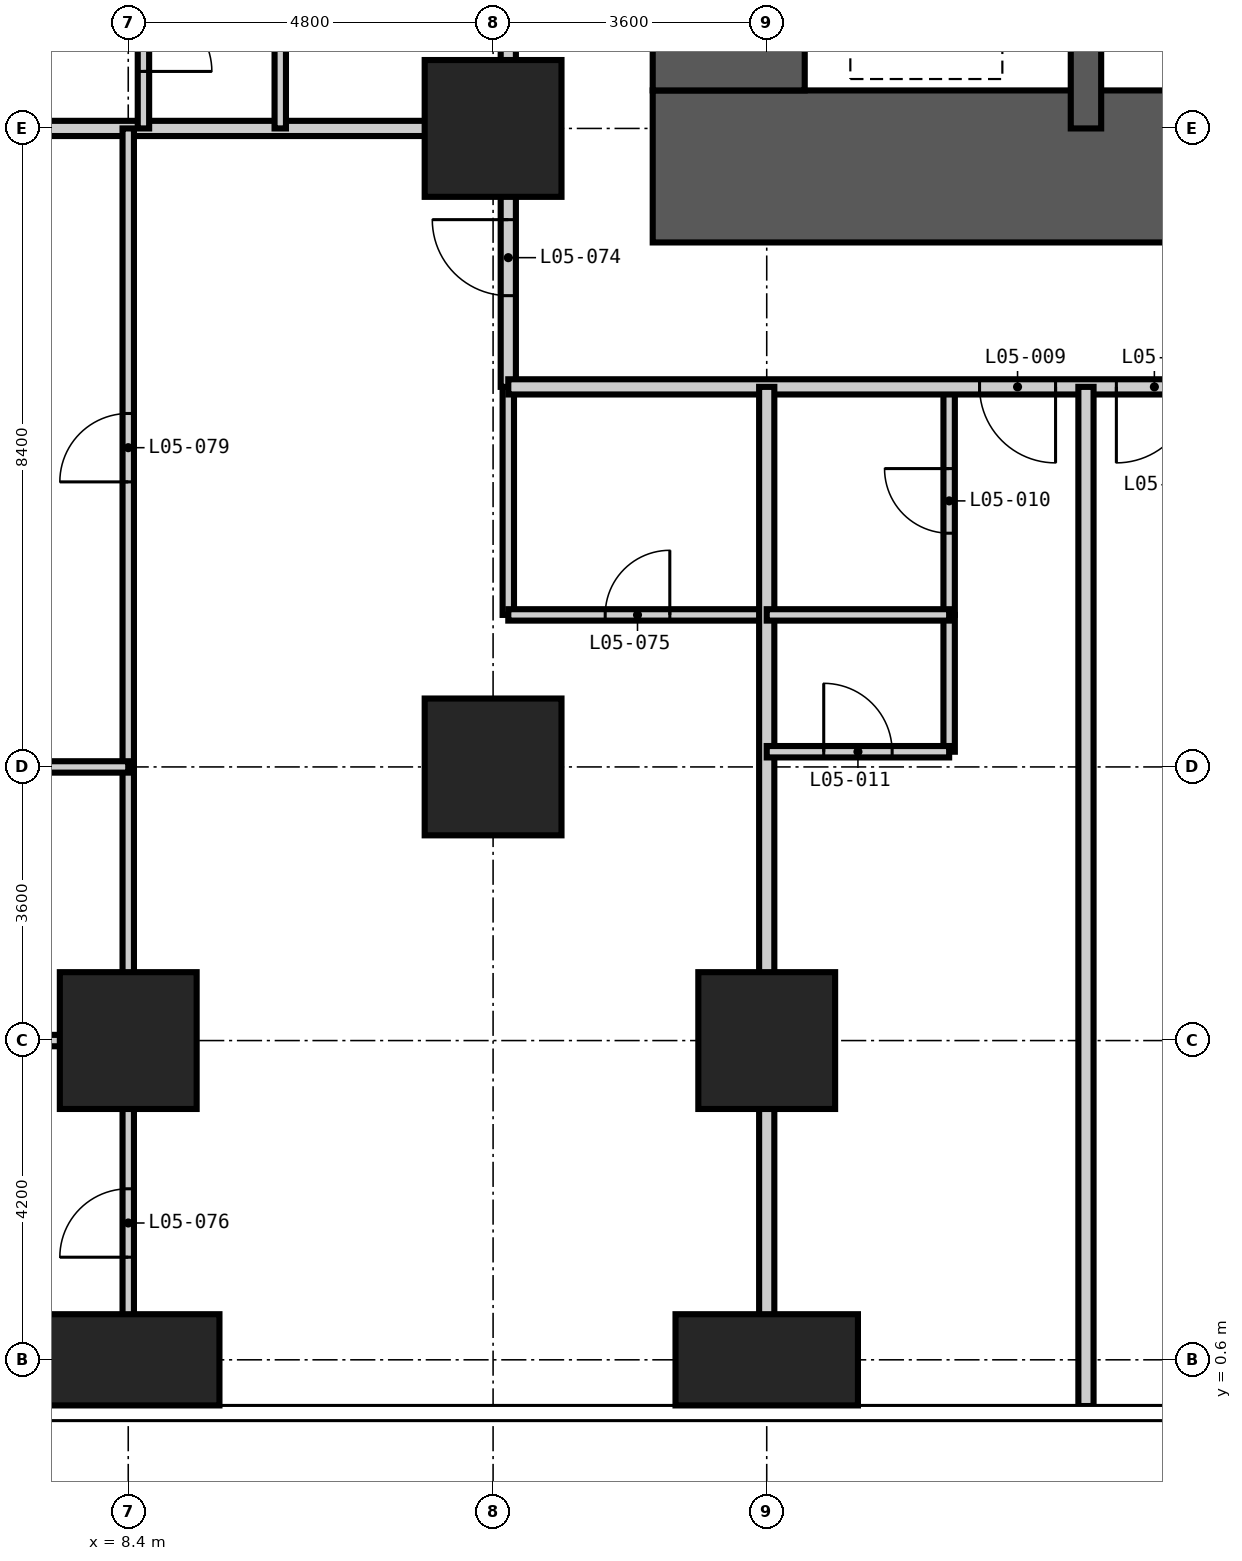
"""IFC4 building model, lengths in metres.
Left out: names, types, materials, properties, quantities, classifications, styles, units other than length and angle.
Written with IfcOpenShell. Run it as: python <this file> out.ifc"""

import sys

from ifc_helpers import new_model, si_unit, direction, frame, frame_2d, origin, origin_2d, place, context, subcontext, project, spatial, rectangle, extrude, element, fill, save


model = new_model("IFC4")
c1 = context("Model", 3, precision=1e-05, world=origin(), true_north=direction((0.0, 1.0)))
c2 = subcontext(c1, "Body", "Model", "MODEL_VIEW")
j1 = project(units=[si_unit("LENGTHUNIT", "METRE"), si_unit("PLANEANGLEUNIT", "RADIAN")], contexts=[c1])
p1 = place(None, origin())
s1 = spatial("IfcSite", under=j1, at=p1, CompositionType="ELEMENT")
p2 = place(p1, origin())
s2 = spatial("IfcBuilding", under=s1, at=p2, CompositionType="ELEMENT")
p3 = place(p2, frame((0.0, 0.0, 27.0)))
s3 = spatial("IfcBuildingStorey", under=s2, at=p3, CompositionType="ELEMENT", Elevation=27.0)
p4 = place(p3, frame((8.4, 0.6, -0.35), z_axis=(0.0, 0.0, 1.0), x_axis=(1.0, 0.0, 0.0)))
e1 = element("IfcColumn", 1, at=p4, inside=s3, PredefinedType="COLUMN", context=c2, shape_type="SweptSolid", body=[
    extrude(rectangle(XDim=2.4, YDim=1.2, at=origin_2d()), origin(), (0.0, 0.0, 1.0), 3.6),
])
for number, where, z_axis, x_axis in (
    (2, (8.4, 4.8, -0.35), (0.0, 0.0, 1.0), (1.0, 0.0, 0.0)),
    (3, (13.2, 8.4, -0.35), (0.0, 0.0, 1.0), (1.0, 0.0, 0.0)),
    (4, (13.2, 16.8, -0.35), (0.0, 0.0, 1.0), (1.0, 0.0, 0.0)),
):
    element("IfcColumn", number, at=place(p3, frame(where, z_axis=z_axis, x_axis=x_axis)), inside=s3, PredefinedType="COLUMN", context=c2, shape_type="SweptSolid", body=[
        extrude(rectangle(XDim=1.8, YDim=1.8, at=origin_2d()), origin(), (0.0, 0.0, 1.0), 3.6),
    ])
p5 = place(p3, frame((16.8, 0.6, -0.35), z_axis=(0.0, 0.0, 1.0), x_axis=(1.0, 0.0, 0.0)))
e5 = element("IfcColumn", 5, at=p5, inside=s3, PredefinedType="COLUMN", context=c2, shape_type="SweptSolid", body=[
    extrude(rectangle(XDim=2.4, YDim=1.2, at=origin_2d()), origin(), (0.0, 0.0, 1.0), 3.6),
])
p6 = place(p3, frame((16.8, 4.8, -0.35), z_axis=(0.0, 0.0, 1.0), x_axis=(1.0, 0.0, 0.0)))
e6 = element("IfcColumn", 6, at=p6, inside=s3, PredefinedType="COLUMN", context=c2, shape_type="SweptSolid", body=[
    extrude(rectangle(XDim=1.8, YDim=1.8, at=origin_2d()), origin(), (0.0, 0.0, 1.0), 3.6),
])
p7 = place(p3, frame((15.3, 16.3, -0.35), z_axis=(0.0, 0.0, 1.0), x_axis=(1.0, 0.0, 0.0)))
e7 = element("IfcWall", 7, at=p7, inside=s3, PredefinedType="SHEAR", context=c2, shape_type="SweptSolid", body=[
    extrude(rectangle(XDim=28.2, YDim=2.0, at=frame_2d((14.1, 0.0))), origin(), (0.0, 0.0, 1.0), 3.6),
])
p8 = place(p7, frame((13.6, 0.0, 0.35)))
e8 = element("IfcOpeningElement", 8, at=p8, cuts=e7, PredefinedType="OPENING", context=c2, shape_type="SweptSolid", body=[
    extrude(rectangle(XDim=1.0, YDim=2.1, at=frame_2d((0.5, 1.05))), frame((0.0, 1.01, 0.0), z_axis=(0.0, -1.0, 0.0), x_axis=(1.0, 0.0, 0.0)), (0.0, 0.0, 1.0), 2.02),
])
p9 = place(p7, frame((19.9, 0.0, 0.35)))
e9 = element("IfcOpeningElement", 9, at=p9, cuts=e7, PredefinedType="OPENING", context=c2, shape_type="SweptSolid", body=[
    extrude(rectangle(XDim=1.0, YDim=2.1, at=frame_2d((0.5, 1.05))), frame((0.0, 1.01, 0.0), z_axis=(0.0, -1.0, 0.0), x_axis=(1.0, 0.0, 0.0)), (0.0, 0.0, 1.0), 2.02),
])
p10 = place(p3, frame((16.3, 41.5, -0.35), z_axis=(0.0, 0.0, 1.0), x_axis=(0.0, -1.0, 0.0)))
e10 = element("IfcWall", 10, at=p10, inside=s3, PredefinedType="SHEAR", context=c2, shape_type="SweptSolid", body=[
    extrude(rectangle(XDim=24.2, YDim=2.0, at=frame_2d((12.1, 0.0))), origin(), (0.0, 0.0, 1.0), 3.6),
])
p11 = place(p10, frame((11.2, 0.0, 0.35)))
e11 = element("IfcOpeningElement", 11, at=p11, cuts=e10, PredefinedType="OPENING", context=c2, shape_type="SweptSolid", body=[
    extrude(rectangle(XDim=1.8, YDim=2.2, at=frame_2d((0.9, 1.1))), frame((0.0, 1.01, 0.0), z_axis=(0.0, -1.0, 0.0), x_axis=(1.0, 0.0, 0.0)), (0.0, 0.0, 1.0), 2.02),
])
p12 = place(p10, frame((20.0, 0.0, 0.35)))
e12 = element("IfcOpeningElement", 12, at=p12, cuts=e10, PredefinedType="OPENING", context=c2, shape_type="SweptSolid", body=[
    extrude(rectangle(XDim=1.0, YDim=2.1, at=frame_2d((0.5, 1.05))), frame((0.0, 1.01, 0.0), z_axis=(0.0, -1.0, 0.0), x_axis=(1.0, 0.0, 0.0)), (0.0, 0.0, 1.0), 2.02),
])
p13 = place(p10, frame((5.3, 0.0, 0.35)))
e13 = element("IfcOpeningElement", 13, at=p13, cuts=e10, PredefinedType="OPENING", context=c2, shape_type="SweptSolid", body=[
    extrude(rectangle(XDim=1.0, YDim=2.1, at=frame_2d((0.5, 1.05))), frame((0.0, 1.01, 0.0), z_axis=(0.0, -1.0, 0.0), x_axis=(1.0, 0.0, 0.0)), (0.0, 0.0, 1.0), 2.02),
])
p14 = place(p3, frame((21.0, 16.8, -0.35), z_axis=(0.0, 0.0, 1.0), x_axis=(0.0, 1.0, 0.0)))
e14 = element("IfcWall", 14, at=p14, inside=s3, PredefinedType="SHEAR", context=c2, shape_type="SweptSolid", body=[
    extrude(rectangle(XDim=2.8, YDim=0.4, at=frame_2d((1.4, 0.0))), origin(), (0.0, 0.0, 1.0), 3.6),
])
p15 = place(p3, frame((13.4, 10.4, 0.0), z_axis=(0.0, 0.0, 1.0), x_axis=(0.0, 1.0, 0.0)))
e15 = element("IfcWall", 15, at=p15, inside=s3, PredefinedType="PARTITIONING", context=c2, shape_type="SweptSolid", body=[
    extrude(rectangle(XDim=3.0, YDim=0.15, at=frame_2d((1.5, 0.0))), origin(), (0.0, 0.0, 1.0), 3.25),
])
p16 = place(p3, frame((19.2, 10.4, 0.0), z_axis=(0.0, 0.0, 1.0), x_axis=(0.0, 1.0, 0.0)))
e16 = element("IfcWall", 16, at=p16, inside=s3, PredefinedType="PARTITIONING", context=c2, shape_type="SweptSolid", body=[
    extrude(rectangle(XDim=3.0, YDim=0.15, at=frame_2d((1.5, 0.0))), origin(), (0.0, 0.0, 1.0), 3.25),
])
p17 = place(p16, frame((1.075, 0.0, 0.0)))
e17 = element("IfcOpeningElement", 17, at=p17, cuts=e16, PredefinedType="OPENING", context=c2, shape_type="SweptSolid", body=[
    extrude(rectangle(XDim=0.85, YDim=2.1, at=frame_2d((0.425, 1.05))), frame((0.0, 0.085, 0.0), z_axis=(0.0, -1.0, 0.0), x_axis=(1.0, 0.0, 0.0)), (0.0, 0.0, 1.0), 0.17),
])
p18 = place(p3, frame((5.4, 4.8, 0.0), z_axis=(0.0, 0.0, 1.0), x_axis=(1.0, 0.0, 0.0)))
e18 = element("IfcWall", 18, at=p18, inside=s3, PredefinedType="PARTITIONING", context=c2, shape_type="SweptSolid", body=[
    extrude(rectangle(XDim=3.0, YDim=0.15, at=frame_2d((1.5, 0.0))), origin(), (0.0, 0.0, 1.0), 3.25),
])
p19 = place(p3, frame((13.4, 10.4, 0.0), z_axis=(0.0, 0.0, 1.0), x_axis=(1.0, 0.0, 0.0)))
e19 = element("IfcWall", 19, at=p19, inside=s3, PredefinedType="PARTITIONING", context=c2, shape_type="SweptSolid", body=[
    extrude(rectangle(XDim=3.4, YDim=0.15, at=frame_2d((1.7, 0.0))), origin(), (0.0, 0.0, 1.0), 3.25),
])
p20 = place(p19, frame((1.275, 0.0, 0.0)))
e20 = element("IfcOpeningElement", 20, at=p20, cuts=e19, PredefinedType="OPENING", context=c2, shape_type="SweptSolid", body=[
    extrude(rectangle(XDim=0.85, YDim=2.1, at=frame_2d((0.425, 1.05))), frame((0.0, 0.085, 0.0), z_axis=(0.0, -1.0, 0.0), x_axis=(1.0, 0.0, 0.0)), (0.0, 0.0, 1.0), 0.17),
])
p21 = place(p3, frame((13.4, 13.4, 0.0), z_axis=(0.0, 0.0, 1.0), x_axis=(0.0, 1.0, 0.0)))
e21 = element("IfcWall", 21, at=p21, inside=s3, PredefinedType="PARTITIONING", context=c2, shape_type="SweptSolid", body=[
    extrude(rectangle(XDim=20.2, YDim=0.2, at=frame_2d((10.1, 0.0))), origin(), (0.0, 0.0, 1.0), 3.25),
])
p22 = place(p21, frame((6.2, 0.0, 0.0)))
e22 = element("IfcOpeningElement", 22, at=p22, cuts=e21, PredefinedType="OPENING", context=c2, shape_type="SweptSolid", body=[
    extrude(rectangle(XDim=1.0, YDim=2.2, at=frame_2d((0.5, 1.1))), frame((0.0, 0.11, 0.0), z_axis=(0.0, -1.0, 0.0), x_axis=(1.0, 0.0, 0.0)), (0.0, 0.0, 1.0), 0.22),
])
p23 = place(p21, frame((8.0, 0.0, 0.0)))
e23 = element("IfcOpeningElement", 23, at=p23, cuts=e21, PredefinedType="OPENING", context=c2, shape_type="SweptSolid", body=[
    extrude(rectangle(XDim=1.0, YDim=2.2, at=frame_2d((0.5, 1.1))), frame((0.0, 0.11, 0.0), z_axis=(0.0, -1.0, 0.0), x_axis=(1.0, 0.0, 0.0)), (0.0, 0.0, 1.0), 0.22),
])
p24 = place(p21, frame((14.6, 0.0, 0.0)))
e24 = element("IfcOpeningElement", 24, at=p24, cuts=e21, PredefinedType="OPENING", context=c2, shape_type="SweptSolid", body=[
    extrude(rectangle(XDim=1.0, YDim=2.2, at=frame_2d((0.5, 1.1))), frame((0.0, 0.11, 0.0), z_axis=(0.0, -1.0, 0.0), x_axis=(1.0, 0.0, 0.0)), (0.0, 0.0, 1.0), 0.22),
])
p25 = place(p21, frame((16.4, 0.0, 0.0)))
e25 = element("IfcOpeningElement", 25, at=p25, cuts=e21, PredefinedType="OPENING", context=c2, shape_type="SweptSolid", body=[
    extrude(rectangle(XDim=1.0, YDim=2.2, at=frame_2d((0.5, 1.1))), frame((0.0, 0.11, 0.0), z_axis=(0.0, -1.0, 0.0), x_axis=(1.0, 0.0, 0.0)), (0.0, 0.0, 1.0), 0.22),
])
p26 = place(p21, frame((1.2, 0.0, 0.0)))
e26 = element("IfcOpeningElement", 26, at=p26, cuts=e21, PredefinedType="OPENING", context=c2, shape_type="SweptSolid", body=[
    extrude(rectangle(XDim=1.0, YDim=2.2, at=frame_2d((0.5, 1.1))), frame((0.0, 0.11, 0.0), z_axis=(0.0, -1.0, 0.0), x_axis=(1.0, 0.0, 0.0)), (0.0, 0.0, 1.0), 0.22),
])
p27 = place(p3, frame((45.7, 13.4, 0.0), z_axis=(0.0, 0.0, 1.0), x_axis=(-1.0, 0.0, 0.0)))
e27 = element("IfcWall", 27, at=p27, inside=s3, PredefinedType="PARTITIONING", context=c2, shape_type="SweptSolid", body=[
    extrude(rectangle(XDim=32.3, YDim=0.2, at=frame_2d((16.15, 0.0))), origin(), (0.0, 0.0, 1.0), 3.25),
])
p28 = place(p27, frame((25.1, 0.0, 0.0)))
e28 = element("IfcOpeningElement", 28, at=p28, cuts=e27, PredefinedType="OPENING", context=c2, shape_type="SweptSolid", body=[
    extrude(rectangle(XDim=1.0, YDim=2.2, at=frame_2d((0.5, 1.1))), frame((0.0, 0.11, 0.0), z_axis=(0.0, -1.0, 0.0), x_axis=(1.0, 0.0, 0.0)), (0.0, 0.0, 1.0), 0.22),
])
p29 = place(p27, frame((23.3, 0.0, 0.0)))
e29 = element("IfcOpeningElement", 29, at=p29, cuts=e27, PredefinedType="OPENING", context=c2, shape_type="SweptSolid", body=[
    extrude(rectangle(XDim=1.0, YDim=2.2, at=frame_2d((0.5, 1.1))), frame((0.0, 0.11, 0.0), z_axis=(0.0, -1.0, 0.0), x_axis=(1.0, 0.0, 0.0)), (0.0, 0.0, 1.0), 0.22),
])
p30 = place(p27, frame((16.7, 0.0, 0.0)))
e30 = element("IfcOpeningElement", 30, at=p30, cuts=e27, PredefinedType="OPENING", context=c2, shape_type="SweptSolid", body=[
    extrude(rectangle(XDim=1.0, YDim=2.2, at=frame_2d((0.5, 1.1))), frame((0.0, 0.11, 0.0), z_axis=(0.0, -1.0, 0.0), x_axis=(1.0, 0.0, 0.0)), (0.0, 0.0, 1.0), 0.22),
])
p31 = place(p27, frame((14.9, 0.0, 0.0)))
e31 = element("IfcOpeningElement", 31, at=p31, cuts=e27, PredefinedType="OPENING", context=c2, shape_type="SweptSolid", body=[
    extrude(rectangle(XDim=1.0, YDim=2.2, at=frame_2d((0.5, 1.1))), frame((0.0, 0.11, 0.0), z_axis=(0.0, -1.0, 0.0), x_axis=(1.0, 0.0, 0.0)), (0.0, 0.0, 1.0), 0.22),
])
p32 = place(p27, frame((8.3, 0.0, 0.0)))
e32 = element("IfcOpeningElement", 32, at=p32, cuts=e27, PredefinedType="OPENING", context=c2, shape_type="SweptSolid", body=[
    extrude(rectangle(XDim=1.0, YDim=2.2, at=frame_2d((0.5, 1.1))), frame((0.0, 0.11, 0.0), z_axis=(0.0, -1.0, 0.0), x_axis=(1.0, 0.0, 0.0)), (0.0, 0.0, 1.0), 0.22),
])
p33 = place(p27, frame((6.5, 0.0, 0.0)))
e33 = element("IfcOpeningElement", 33, at=p33, cuts=e27, PredefinedType="OPENING", context=c2, shape_type="SweptSolid", body=[
    extrude(rectangle(XDim=1.0, YDim=2.2, at=frame_2d((0.5, 1.1))), frame((0.0, 0.11, 0.0), z_axis=(0.0, -1.0, 0.0), x_axis=(1.0, 0.0, 0.0)), (0.0, 0.0, 1.0), 0.22),
])
for number, where, z_axis, x_axis in (
    (34, (16.8, -0.008, 0.0), (0.0, 0.0, 1.0), (0.0, 1.0, 0.0)),
    (35, (21.0, -0.008, 0.0), (0.0, 0.0, 1.0), (0.0, 1.0, 0.0)),
    (36, (-0.008, 16.8, 0.0), (0.0, 0.0, 1.0), (1.0, 0.0, 0.0)),
):
    element("IfcWall", number, at=place(p3, frame(where, z_axis=z_axis, x_axis=x_axis)), inside=s3, PredefinedType="PARTITIONING", context=c2, shape_type="SweptSolid", body=[
        extrude(rectangle(XDim=13.408, YDim=0.2, at=frame_2d((6.704, 0.0))), origin(), (0.0, 0.0, 1.0), 3.25),
    ])
p34 = place(p3, frame((8.4, -0.008, 0.0), z_axis=(0.0, 0.0, 1.0), x_axis=(0.0, 1.0, 0.0)))
e37 = element("IfcWall", 37, at=p34, inside=s3, PredefinedType="PARTITIONING", context=c2, shape_type="SweptSolid", body=[
    extrude(rectangle(XDim=16.808, YDim=0.15, at=frame_2d((8.404, 0.0))), origin(), (0.0, 0.0, 1.0), 3.25),
])
p35 = place(p34, frame((1.958, 0.0, 0.0)))
e38 = element("IfcOpeningElement", 38, at=p35, cuts=e37, PredefinedType="OPENING", context=c2, shape_type="SweptSolid", body=[
    extrude(rectangle(XDim=0.9, YDim=2.1, at=frame_2d((0.45, 1.05))), frame((0.0, 0.085, 0.0), z_axis=(0.0, -1.0, 0.0), x_axis=(1.0, 0.0, 0.0)), (0.0, 0.0, 1.0), 0.17),
])
p36 = place(p34, frame((12.158, 0.0, 0.0)))
e39 = element("IfcOpeningElement", 39, at=p36, cuts=e37, PredefinedType="OPENING", context=c2, shape_type="SweptSolid", body=[
    extrude(rectangle(XDim=0.9, YDim=2.1, at=frame_2d((0.45, 1.05))), frame((0.0, 0.085, 0.0), z_axis=(0.0, -1.0, 0.0), x_axis=(1.0, 0.0, 0.0)), (0.0, 0.0, 1.0), 0.17),
])
p37 = place(p3, frame((8.6, 16.8, 0.0), z_axis=(0.0, 0.0, 1.0), x_axis=(0.0, 1.0, 0.0)))
e40 = element("IfcWall", 40, at=p37, inside=s3, PredefinedType="PARTITIONING", context=c2, shape_type="SweptSolid", body=[
    extrude(rectangle(XDim=2.4, YDim=0.15, at=frame_2d((1.2, 0.0))), origin(), (0.0, 0.0, 1.0), 3.25),
])
p38 = place(p37, frame((0.75, 0.0, 0.0)))
e41 = element("IfcOpeningElement", 41, at=p38, cuts=e40, PredefinedType="OPENING", context=c2, shape_type="SweptSolid", body=[
    extrude(rectangle(XDim=0.9, YDim=2.1, at=frame_2d((0.45, 1.05))), frame((0.0, 0.085, 0.0), z_axis=(0.0, -1.0, 0.0), x_axis=(1.0, 0.0, 0.0)), (0.0, 0.0, 1.0), 0.17),
])
p39 = place(p3, frame((10.4, 16.8, 0.0), z_axis=(0.0, 0.0, 1.0), x_axis=(0.0, 1.0, 0.0)))
e42 = element("IfcWall", 42, at=p39, inside=s3, PredefinedType="PARTITIONING", context=c2, shape_type="SweptSolid", body=[
    extrude(rectangle(XDim=2.4, YDim=0.15, at=frame_2d((1.2, 0.0))), origin(), (0.0, 0.0, 1.0), 3.25),
])
p40 = place(p3, frame((19.2, 8.6, 0.0), z_axis=(0.0, 0.0, 1.0), x_axis=(0.0, 1.0, 0.0)))
e43 = element("IfcWall", 43, at=p40, inside=s3, PredefinedType="PARTITIONING", context=c2, shape_type="SweptSolid", body=[
    extrude(rectangle(XDim=1.8, YDim=0.15, at=frame_2d((0.9, 0.0))), origin(), (0.0, 0.0, 1.0), 3.25),
])
p41 = place(p3, frame((-0.008, 8.4, 0.0), z_axis=(0.0, 0.0, 1.0), x_axis=(1.0, 0.0, 0.0)))
e44 = element("IfcWall", 44, at=p41, inside=s3, PredefinedType="PARTITIONING", context=c2, shape_type="SweptSolid", body=[
    extrude(rectangle(XDim=8.408, YDim=0.15, at=frame_2d((4.204, 0.0))), origin(), (0.0, 0.0, 1.0), 3.25),
])
p42 = place(p41, frame((2.958, 0.0, 0.0)))
e45 = element("IfcOpeningElement", 45, at=p42, cuts=e44, PredefinedType="OPENING", context=c2, shape_type="SweptSolid", body=[
    extrude(rectangle(XDim=0.9, YDim=2.1, at=frame_2d((0.45, 1.05))), frame((0.0, 0.085, 0.0), z_axis=(0.0, -1.0, 0.0), x_axis=(1.0, 0.0, 0.0)), (0.0, 0.0, 1.0), 0.17),
])
p43 = place(p3, frame((16.8, 8.6, 0.0), z_axis=(0.0, 0.0, 1.0), x_axis=(1.0, 0.0, 0.0)))
e46 = element("IfcWall", 46, at=p43, inside=s3, PredefinedType="PARTITIONING", context=c2, shape_type="SweptSolid", body=[
    extrude(rectangle(XDim=2.4, YDim=0.15, at=frame_2d((1.2, 0.0))), origin(), (0.0, 0.0, 1.0), 3.25),
])
p44 = place(p43, frame((0.75, 0.0, 0.0)))
e47 = element("IfcOpeningElement", 47, at=p44, cuts=e46, PredefinedType="OPENING", context=c2, shape_type="SweptSolid", body=[
    extrude(rectangle(XDim=0.9, YDim=2.1, at=frame_2d((0.45, 1.05))), frame((0.0, 0.085, 0.0), z_axis=(0.0, -1.0, 0.0), x_axis=(1.0, 0.0, 0.0)), (0.0, 0.0, 1.0), 0.17),
])
p45 = place(p3, frame((16.8, 10.4, 0.0), z_axis=(0.0, 0.0, 1.0), x_axis=(1.0, 0.0, 0.0)))
e48 = element("IfcWall", 48, at=p45, inside=s3, PredefinedType="PARTITIONING", context=c2, shape_type="SweptSolid", body=[
    extrude(rectangle(XDim=2.4, YDim=0.15, at=frame_2d((1.2, 0.0))), origin(), (0.0, 0.0, 1.0), 3.25),
])
p46 = place(p28, origin())
e49 = element("IfcDoor", 49, at=p46, inside=s3, OperationType="SINGLE_SWING_LEFT", PredefinedType="DOOR", context=c2, shape_type="SweptSolid", body=[
    extrude(rectangle(XDim=1.0, YDim=2.2, at=frame_2d((0.5, 1.1))), frame((0.0, 0.025, 0.0), z_axis=(0.0, -1.0, 0.0), x_axis=(1.0, 0.0, 0.0)), (0.0, 0.0, 1.0), 0.05),
])
fill(e28, e49)
p47 = place(p17, origin())
e50 = element("IfcDoor", 50, at=p47, inside=s3, OperationType="SINGLE_SWING_RIGHT", PredefinedType="DOOR", context=c2, shape_type="SweptSolid", body=[
    extrude(rectangle(XDim=0.85, YDim=2.1, at=frame_2d((0.425, 1.05))), frame((0.0, 0.025, 0.0), z_axis=(0.0, -1.0, 0.0), x_axis=(1.0, 0.0, 0.0)), (0.0, 0.0, 1.0), 0.05),
])
fill(e17, e50)
p48 = place(p44, origin())
e51 = element("IfcDoor", 51, at=p48, inside=s3, OperationType="SINGLE_SWING_LEFT", PredefinedType="DOOR", context=c2, shape_type="SweptSolid", body=[
    extrude(rectangle(XDim=0.9, YDim=2.1, at=frame_2d((0.45, 1.05))), frame((0.0, 0.025, 0.0), z_axis=(0.0, -1.0, 0.0), x_axis=(1.0, 0.0, 0.0)), (0.0, 0.0, 1.0), 0.05),
])
fill(e47, e51)
p49 = place(p29, origin())
e52 = element("IfcDoor", 52, at=p49, inside=s3, OperationType="SINGLE_SWING_RIGHT", PredefinedType="DOOR", context=c2, shape_type="SweptSolid", body=[
    extrude(rectangle(XDim=1.0, YDim=2.2, at=frame_2d((0.5, 1.1))), frame((0.0, 0.025, 0.0), z_axis=(0.0, -1.0, 0.0), x_axis=(1.0, 0.0, 0.0)), (0.0, 0.0, 1.0), 0.05),
])
fill(e29, e52)
p50 = place(p38, frame((0.9, 0.0, 0.0), z_axis=(0.0, 0.0, 1.0), x_axis=(-1.0, 0.0, 0.0)))
e53 = element("IfcDoor", 53, at=p50, inside=s3, OperationType="SINGLE_SWING_RIGHT", PredefinedType="DOOR", context=c2, shape_type="SweptSolid", body=[
    extrude(rectangle(XDim=0.9, YDim=2.1, at=frame_2d((0.45, 1.05))), frame((0.0, 0.025, 0.0), z_axis=(0.0, -1.0, 0.0), x_axis=(1.0, 0.0, 0.0)), (0.0, 0.0, 1.0), 0.05),
])
fill(e41, e53)
p51 = place(p26, origin())
e54 = element("IfcDoor", 54, at=p51, inside=s3, OperationType="SINGLE_SWING_RIGHT", PredefinedType="DOOR", context=c2, shape_type="SweptSolid", body=[
    extrude(rectangle(XDim=1.0, YDim=2.2, at=frame_2d((0.5, 1.1))), frame((0.0, 0.025, 0.0), z_axis=(0.0, -1.0, 0.0), x_axis=(1.0, 0.0, 0.0)), (0.0, 0.0, 1.0), 0.05),
])
fill(e26, e54)
p52 = place(p20, origin())
e55 = element("IfcDoor", 55, at=p52, inside=s3, OperationType="SINGLE_SWING_RIGHT", PredefinedType="DOOR", context=c2, shape_type="SweptSolid", body=[
    extrude(rectangle(XDim=0.85, YDim=2.1, at=frame_2d((0.425, 1.05))), frame((0.0, 0.025, 0.0), z_axis=(0.0, -1.0, 0.0), x_axis=(1.0, 0.0, 0.0)), (0.0, 0.0, 1.0), 0.05),
])
fill(e20, e55)
p53 = place(p35, origin())
e56 = element("IfcDoor", 56, at=p53, inside=s3, OperationType="SINGLE_SWING_LEFT", PredefinedType="DOOR", context=c2, shape_type="SweptSolid", body=[
    extrude(rectangle(XDim=0.9, YDim=2.1, at=frame_2d((0.45, 1.05))), frame((0.0, 0.025, 0.0), z_axis=(0.0, -1.0, 0.0), x_axis=(1.0, 0.0, 0.0)), (0.0, 0.0, 1.0), 0.05),
])
fill(e38, e56)
p54 = place(p36, origin())
e57 = element("IfcDoor", 57, at=p54, inside=s3, OperationType="SINGLE_SWING_LEFT", PredefinedType="DOOR", context=c2, shape_type="SweptSolid", body=[
    extrude(rectangle(XDim=0.9, YDim=2.1, at=frame_2d((0.45, 1.05))), frame((0.0, 0.025, 0.0), z_axis=(0.0, -1.0, 0.0), x_axis=(1.0, 0.0, 0.0)), (0.0, 0.0, 1.0), 0.05),
])
fill(e39, e57)
save(model, sys.argv[1])
